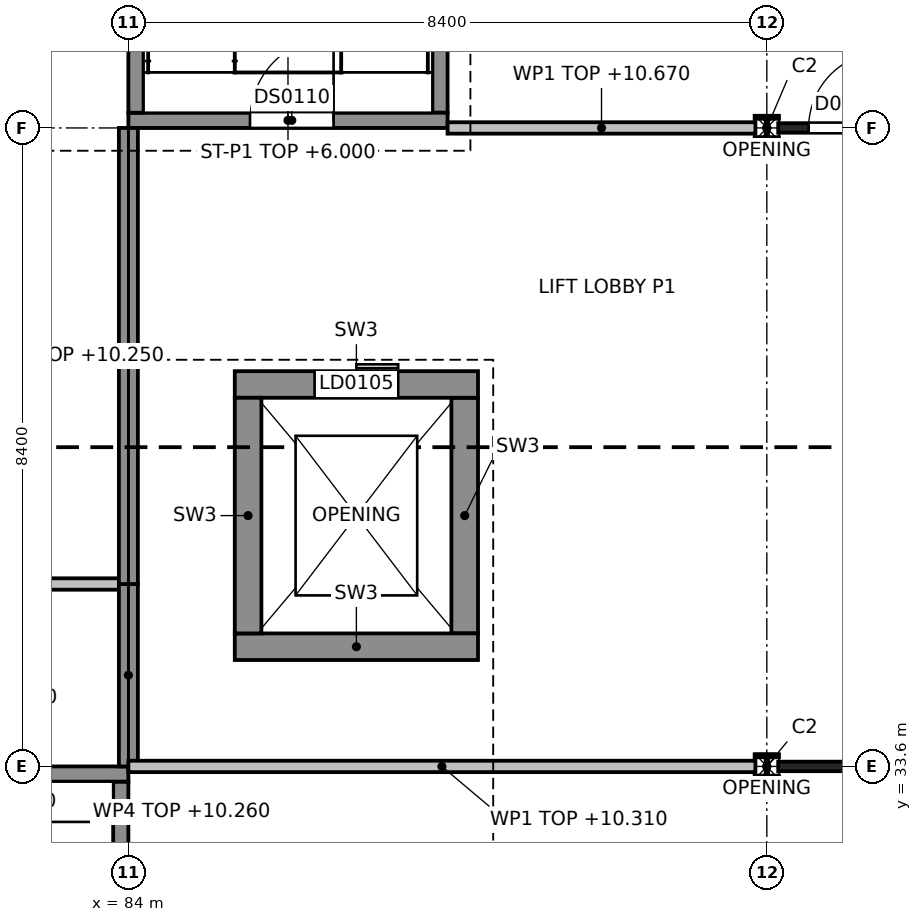
"""IFC4 building model, lengths in metres.
Left out: names, types, materials, properties, quantities, classifications, styles, units other than length and angle.
Written with IfcOpenShell. Run it as: python <this file> out.ifc"""

import sys

from ifc_helpers import new_model, si_unit, direction, frame, frame_2d, origin, origin_2d, place, context, subcontext, project, spatial, rectangle, i_section, extrude, element, fill, save


model = new_model("IFC4")
c1 = context("Model", 3, precision=1e-05, world=origin(), true_north=direction((0.0, 1.0)))
c2 = subcontext(c1, "Body", "Model", "MODEL_VIEW")
j1 = project(units=[si_unit("LENGTHUNIT", "METRE"), si_unit("PLANEANGLEUNIT", "RADIAN")], contexts=[c1])
p1 = place(None, origin())
s1 = spatial("IfcSite", under=j1, at=p1, CompositionType="ELEMENT")
p2 = place(p1, origin())
s2 = spatial("IfcBuilding", under=s1, at=p2, CompositionType="ELEMENT")
p3 = place(p2, frame((0.0, 0.0, 6.0)))
s3 = spatial("IfcBuildingStorey", under=s2, at=p3, CompositionType="ELEMENT", Elevation=6.0)
for number, where, z_axis, x_axis in (
    (1, (92.4, 33.6, 0.0), (0.0, 0.0, 1.0), (1.0, 0.0, 0.0)),
    (2, (92.4, 42.0, 0.0), (0.0, 0.0, 1.0), (1.0, 0.0, 0.0)),
):
    element("IfcColumn", number, at=place(p3, frame(where, z_axis=z_axis, x_axis=x_axis)), inside=s3, PredefinedType="COLUMN", context=c2, shape_type="SweptSolid", body=[
        extrude(i_section(OverallWidth=0.3, OverallDepth=0.3, WebThickness=0.011, FlangeThickness=0.019, at=origin_2d()), origin(), (0.0, 0.0, 1.0), 4.8),
    ])
p4 = place(p3, frame((79.8, 33.5, 0.0), z_axis=(0.0, 0.0, 1.0), x_axis=(1.0, 0.0, 0.0)))
e3 = element("IfcWall", 3, at=p4, inside=s3, PredefinedType="SHEAR", context=c2, shape_type="SweptSolid", body=[
    extrude(rectangle(XDim=4.2, YDim=0.2, at=frame_2d((2.1, 0.0))), origin(), (0.0, 0.0, 1.0), 4.2),
])
p5 = place(p4, frame((1.6, 0.0, 0.0)))
e4 = element("IfcOpeningElement", 4, at=p5, cuts=e3, PredefinedType="OPENING", context=c2, shape_type="SweptSolid", body=[
    extrude(rectangle(XDim=1.1, YDim=2.1, at=frame_2d((0.55, 1.05))), frame((0.0, 0.1, 0.0), z_axis=(0.0, -1.0, 0.0), x_axis=(1.0, 0.0, 0.0)), (0.0, 0.0, 1.0), 0.2),
])
p6 = place(p3, frame((83.9, 25.4, 0.0), z_axis=(0.0, 0.0, 1.0), x_axis=(0.0, 1.0, 0.0)))
e5 = element("IfcWall", 5, at=p6, inside=s3, PredefinedType="SHEAR", context=c2, shape_type="SweptSolid", body=[
    extrude(rectangle(XDim=8.0, YDim=0.2, at=frame_2d((4.0, 0.0))), origin(), (0.0, 0.0, 1.0), 4.2),
])
p7 = place(p3, frame((84.0, 42.1, 0.0), z_axis=(0.0, 0.0, 1.0), x_axis=(1.0, 0.0, 0.0)))
e6 = element("IfcWall", 6, at=p7, inside=s3, PredefinedType="SHEAR", context=c2, shape_type="SweptSolid", body=[
    extrude(rectangle(XDim=4.2, YDim=0.2, at=frame_2d((2.1, 0.0))), origin(), (0.0, 0.0, 1.0), 4.8),
])
p8 = place(p7, frame((1.6, 0.0, 0.0)))
e7 = element("IfcOpeningElement", 7, at=p8, cuts=e6, PredefinedType="OPENING", context=c2, shape_type="SweptSolid", body=[
    extrude(rectangle(XDim=1.1, YDim=2.1, at=frame_2d((0.55, 1.05))), frame((0.0, 0.1, 0.0), z_axis=(0.0, -1.0, 0.0), x_axis=(1.0, 0.0, 0.0)), (0.0, 0.0, 1.0), 0.2),
])
for number, where, z_axis, x_axis in (
    (8, (84.1, 42.2, 0.0), (0.0, 0.0, 1.0), (0.0, 1.0, 0.0)),
    (9, (88.1, 42.2, 0.0), (0.0, 0.0, 1.0), (0.0, 1.0, 0.0)),
):
    element("IfcWall", number, at=place(p3, frame(where, z_axis=z_axis, x_axis=x_axis)), inside=s3, PredefinedType="SHEAR", context=c2, shape_type="SweptSolid", body=[
        extrude(rectangle(XDim=8.0, YDim=0.2, at=frame_2d((4.0, 0.0))), origin(), (0.0, 0.0, 1.0), 4.8),
    ])
p9 = place(p3, frame((85.4, 35.175, 0.0), z_axis=(0.0, 0.0, 1.0), x_axis=(1.0, 0.0, 0.0)))
e10 = element("IfcWall", 10, at=p9, inside=s3, PredefinedType="SHEAR", context=c2, shape_type="SweptSolid", body=[
    extrude(rectangle(XDim=3.2, YDim=0.35, at=frame_2d((1.6, 0.0))), origin(), (0.0, 0.0, 1.0), 4.8),
])
p10 = place(p3, frame((85.4, 38.625, 0.0), z_axis=(0.0, 0.0, 1.0), x_axis=(1.0, 0.0, 0.0)))
e11 = element("IfcWall", 11, at=p10, inside=s3, PredefinedType="SHEAR", context=c2, shape_type="SweptSolid", body=[
    extrude(rectangle(XDim=3.2, YDim=0.35, at=frame_2d((1.6, 0.0))), origin(), (0.0, 0.0, 1.0), 4.8),
])
p11 = place(p10, frame((1.05, 0.0, 0.0)))
e12 = element("IfcOpeningElement", 12, at=p11, cuts=e11, PredefinedType="OPENING", context=c2, shape_type="SweptSolid", body=[
    extrude(rectangle(XDim=1.1, YDim=2.1, at=frame_2d((0.55, 1.05))), frame((0.0, 0.175, 0.0), z_axis=(0.0, -1.0, 0.0), x_axis=(1.0, 0.0, 0.0)), (0.0, 0.0, 1.0), 0.35),
])
for number, where, z_axis, x_axis in (
    (13, (85.575, 35.35, 0.0), (0.0, 0.0, 1.0), (0.0, 1.0, 0.0)),
    (14, (88.425, 35.35, 0.0), (0.0, 0.0, 1.0), (0.0, 1.0, 0.0)),
):
    element("IfcWall", number, at=place(p3, frame(where, z_axis=z_axis, x_axis=x_axis)), inside=s3, PredefinedType="SHEAR", context=c2, shape_type="SweptSolid", body=[
        extrude(rectangle(XDim=3.1, YDim=0.35, at=frame_2d((1.55, 0.0))), origin(), (0.0, 0.0, 1.0), 4.8),
    ])
p12 = place(p3, frame((75.6, 36.0, 0.0), z_axis=(0.0, 0.0, 1.0), x_axis=(1.0, 0.0, 0.0)))
e15 = element("IfcWall", 15, at=p12, inside=s3, PredefinedType="PARTITIONING", context=c2, shape_type="SweptSolid", body=[
    extrude(rectangle(XDim=8.4, YDim=0.15, at=frame_2d((4.2, 0.0))), origin(), (0.0, 0.0, 1.0), 4.2),
])
p13 = place(p12, frame((3.25, 0.0, 0.0)))
e16 = element("IfcOpeningElement", 16, at=p13, cuts=e15, PredefinedType="OPENING", context=c2, shape_type="SweptSolid", body=[
    extrude(rectangle(XDim=1.8, YDim=2.1, at=frame_2d((0.9, 1.05))), frame((0.0, 0.075, 0.0), z_axis=(0.0, -1.0, 0.0), x_axis=(1.0, 0.0, 0.0)), (0.0, 0.0, 1.0), 0.15),
])
p14 = place(p3, frame((84.0, 33.6, 0.0), z_axis=(0.0, 0.0, 1.0), x_axis=(0.0, 1.0, 0.0)))
e17 = element("IfcWall", 17, at=p14, inside=s3, PredefinedType="PARTITIONING", context=c2, shape_type="SweptSolid", body=[
    extrude(rectangle(XDim=2.4, YDim=0.25, at=frame_2d((1.2, 0.0))), origin(), (0.0, 0.0, 1.0), 4.26),
])
p15 = place(p3, frame((84.0, 36.0, 0.0), z_axis=(0.0, 0.0, 1.0), x_axis=(0.0, 1.0, 0.0)))
e18 = element("IfcWall", 18, at=p15, inside=s3, PredefinedType="PARTITIONING", context=c2, shape_type="SweptSolid", body=[
    extrude(rectangle(XDim=6.0, YDim=0.25, at=frame_2d((3.0, 0.0))), origin(), (0.0, 0.0, 1.0), 4.25),
])
p16 = place(p3, frame((84.0, 33.6, 0.0), z_axis=(0.0, 0.0, 1.0), x_axis=(1.0, 0.0, 0.0)))
e19 = element("IfcWall", 19, at=p16, inside=s3, PredefinedType="PARTITIONING", context=c2, shape_type="SweptSolid", body=[
    extrude(rectangle(XDim=8.25, YDim=0.15, at=frame_2d((4.125, 0.0))), origin(), (0.0, 0.0, 1.0), 4.31),
])
p17 = place(p3, frame((92.55, 33.6, 0.0), z_axis=(0.0, 0.0, 1.0), x_axis=(1.0, 0.0, 0.0)))
e20 = element("IfcWall", 20, at=p17, inside=s3, PredefinedType="PARTITIONING", context=c2, shape_type="SweptSolid", body=[
    extrude(rectangle(XDim=4.05, YDim=0.125, at=frame_2d((2.025, 0.0))), origin(), (0.0, 0.0, 1.0), 4.31),
])
p18 = place(p17, frame((1.0, 0.0, 0.0)))
e21 = element("IfcOpeningElement", 21, at=p18, cuts=e20, PredefinedType="OPENING", context=c2, shape_type="SweptSolid", body=[
    extrude(rectangle(XDim=1.8, YDim=2.1, at=frame_2d((0.9, 1.05))), frame((0.0, 0.062, 0.0), z_axis=(0.0, -1.0, 0.0), x_axis=(1.0, 0.0, 0.0)), (0.0, 0.0, 1.0), 0.125),
])
p19 = place(p3, frame((88.2, 42.0, 0.0), z_axis=(0.0, 0.0, 1.0), x_axis=(1.0, 0.0, 0.0)))
e22 = element("IfcWall", 22, at=p19, inside=s3, PredefinedType="PARTITIONING", context=c2, shape_type="SweptSolid", body=[
    extrude(rectangle(XDim=4.05, YDim=0.15, at=frame_2d((2.025, 0.0))), origin(), (0.0, 0.0, 1.0), 4.67),
])
p20 = place(p3, frame((92.55, 42.0, 0.0), z_axis=(0.0, 0.0, 1.0), x_axis=(1.0, 0.0, 0.0)))
e23 = element("IfcWall", 23, at=p20, inside=s3, PredefinedType="PARTITIONING", context=c2, shape_type="SweptSolid", body=[
    extrude(rectangle(XDim=1.95, YDim=0.125, at=frame_2d((0.975, 0.0))), origin(), (0.0, 0.0, 1.0), 4.31),
])
p21 = place(p20, frame((0.4, 0.0, 0.0)))
e24 = element("IfcOpeningElement", 24, at=p21, cuts=e23, PredefinedType="OPENING", context=c2, shape_type="SweptSolid", body=[
    extrude(rectangle(XDim=1.0, YDim=2.1, at=frame_2d((0.5, 1.05))), frame((0.0, 0.062, 0.0), z_axis=(0.0, -1.0, 0.0), x_axis=(1.0, 0.0, 0.0)), (0.0, 0.0, 1.0), 0.125),
])
p22 = place(p21, origin())
e25 = element("IfcDoor", 25, at=p22, inside=s3, OperationType="SINGLE_SWING_RIGHT", PredefinedType="DOOR", context=c2, shape_type="SweptSolid", body=[
    extrude(rectangle(XDim=1.0, YDim=2.1, at=frame_2d((0.5, 1.05))), frame((0.0, 0.025, 0.0), z_axis=(0.0, -1.0, 0.0), x_axis=(1.0, 0.0, 0.0)), (0.0, 0.0, 1.0), 0.05),
])
fill(e24, e25)
p23 = place(p8, origin())
e26 = element("IfcDoor", 26, at=p23, inside=s3, OperationType="SINGLE_SWING_RIGHT", PredefinedType="DOOR", context=c2, shape_type="SweptSolid", body=[
    extrude(rectangle(XDim=1.1, YDim=2.1, at=frame_2d((0.55, 1.05))), frame((0.0, 0.025, 0.0), z_axis=(0.0, -1.0, 0.0), x_axis=(1.0, 0.0, 0.0)), (0.0, 0.0, 1.0), 0.05),
])
fill(e7, e26)
p24 = place(p11, origin())
e27 = element("IfcDoor", 27, at=p24, inside=s3, OperationType="SLIDING_TO_LEFT", PredefinedType="DOOR", context=c2, shape_type="SweptSolid", body=[
    extrude(rectangle(XDim=1.1, YDim=2.1, at=frame_2d((0.55, 1.05))), frame((0.0, 0.025, 0.0), z_axis=(0.0, -1.0, 0.0), x_axis=(1.0, 0.0, 0.0)), (0.0, 0.0, 1.0), 0.05),
])
fill(e12, e27)
save(model, sys.argv[1])
